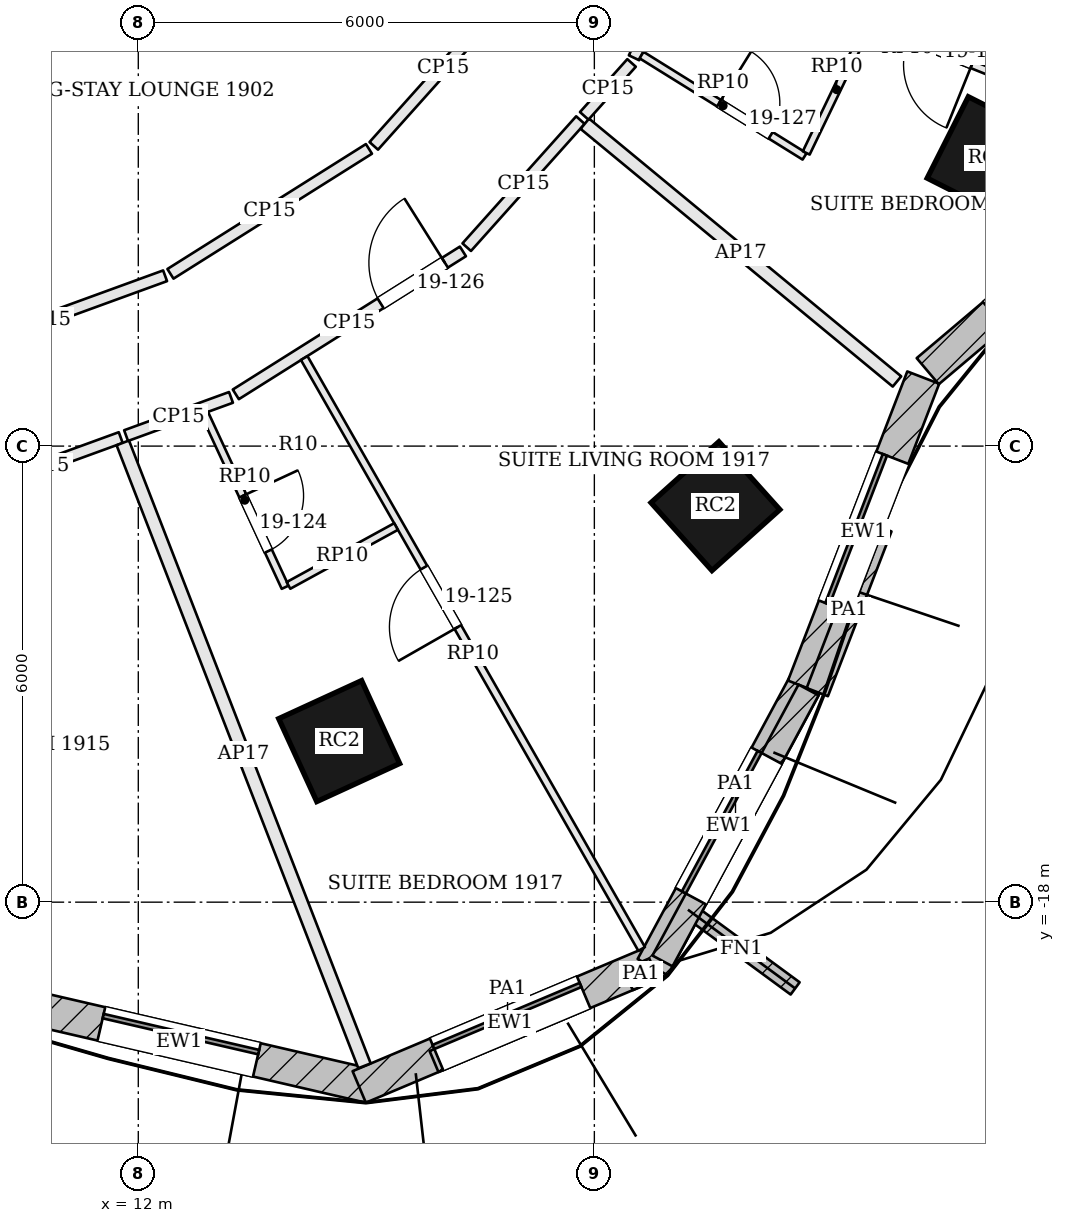
"""IFC4 building model, lengths in metres.
Left out: names, types, materials, properties, quantities, classifications, styles, units other than length and angle.
Written with IfcOpenShell. Run it as: python <this file> out.ifc"""

import sys

from ifc_helpers import new_model, si_unit, direction, frame, frame_2d, origin, origin_2d, place, context, subcontext, project, spatial, rectangle, extrude, element, fill, save


model = new_model("IFC4")
c1 = context("Model", 3, precision=1e-05, world=origin(), true_north=direction((0.0, 1.0)))
c2 = subcontext(c1, "Body", "Model", "MODEL_VIEW")
j1 = project(units=[si_unit("LENGTHUNIT", "METRE"), si_unit("PLANEANGLEUNIT", "RADIAN")], contexts=[c1])
p1 = place(None, origin())
s1 = spatial("IfcSite", under=j1, at=p1, CompositionType="ELEMENT")
p2 = place(p1, origin())
s2 = spatial("IfcBuilding", under=s1, at=p2, CompositionType="ELEMENT")
p3 = place(p2, frame((0.0, 0.0, 85.2)))
s3 = spatial("IfcBuildingStorey", under=s2, at=p3, CompositionType="ELEMENT", Elevation=85.2)
for number, where, z_axis, x_axis in (
    (1, (14.643, -15.881, 0.0), (0.0, 0.0, 1.0), (0.909, 0.417, 0.0)),
    (2, (19.593, -12.79, 0.0), (0.0, 0.0, 1.0), (0.744, 0.668, 0.0)),
    (3, (23.185, -8.21, 0.0), (0.0, 0.0, 1.0), (0.451, 0.893, 0.0)),
):
    element("IfcColumn", number, at=place(p3, frame(where, z_axis=z_axis, x_axis=x_axis)), inside=s3, PredefinedType="COLUMN", context=c2, shape_type="SweptSolid", body=[
        extrude(rectangle(XDim=1.2, YDim=1.2, at=origin_2d()), origin(), (0.0, 0.0, 1.0), 3.6),
    ])
p4 = place(p3, frame((10.034, -19.259, 0.0), z_axis=(0.0, 0.0, 1.0), x_axis=(0.974223567844, -0.225584662283, 0.0)))
e4 = element("IfcWall", 4, at=p4, inside=s3, PredefinedType="SOLIDWALL", context=c2, shape_type="SweptSolid", body=[
    extrude(rectangle(XDim=5.139, YDim=0.45, at=frame_2d((2.569, 0.0))), origin(), (0.0, 0.0, 1.0), 3.4),
])
p5 = place(p4, frame((1.519, 0.0, 0.9)))
e5 = element("IfcOpeningElement", 5, at=p5, cuts=e4, PredefinedType="OPENING", context=c2, shape_type="SweptSolid", body=[
    extrude(rectangle(XDim=2.1, YDim=2.0, at=frame_2d((1.05, 1.0))), frame((0.0, 0.235, 0.0), z_axis=(0.0, -1.0, 0.0), x_axis=(1.0, 0.0, 0.0)), (0.0, 0.0, 1.0), 0.47),
])
p6 = place(p3, frame((14.906, -20.431, 0.0), z_axis=(0.0, 0.0, 1.0), x_axis=(0.921435803521, 0.388530642279, 0.0)))
e6 = element("IfcWall", 6, at=p6, inside=s3, PredefinedType="SOLIDWALL", context=c2, shape_type="SweptSolid", body=[
    extrude(rectangle(XDim=4.309, YDim=0.45, at=frame_2d((2.154, 0.0))), origin(), (0.0, 0.0, 1.0), 3.4),
])
p7 = place(p6, frame((1.104, 0.0, 0.9)))
e7 = element("IfcOpeningElement", 7, at=p7, cuts=e6, PredefinedType="OPENING", context=c2, shape_type="SweptSolid", body=[
    extrude(rectangle(XDim=2.1, YDim=2.0, at=frame_2d((1.05, 1.0))), frame((0.0, 0.235, 0.0), z_axis=(0.0, -1.0, 0.0), x_axis=(1.0, 0.0, 0.0)), (0.0, 0.0, 1.0), 0.47),
])
p8 = place(p3, frame((18.767, -18.854, 0.0), z_axis=(0.0, 0.0, 1.0), x_axis=(0.474475888716, 0.880268499395, 0.0)))
e8 = element("IfcWall", 8, at=p8, inside=s3, PredefinedType="SOLIDWALL", context=c2, shape_type="SweptSolid", body=[
    extrude(rectangle(XDim=4.219, YDim=0.45, at=frame_2d((2.11, 0.0))), origin(), (0.0, 0.0, 1.0), 3.4),
])
p9 = place(p8, frame((1.06, 0.0, 0.9)))
e9 = element("IfcOpeningElement", 9, at=p9, cuts=e8, PredefinedType="OPENING", context=c2, shape_type="SweptSolid", body=[
    extrude(rectangle(XDim=2.1, YDim=2.0, at=frame_2d((1.05, 1.0))), frame((0.0, 0.235, 0.0), z_axis=(0.0, -1.0, 0.0), x_axis=(1.0, 0.0, 0.0)), (0.0, 0.0, 1.0), 0.47),
])
p10 = place(p3, frame((20.757, -15.166, 0.0), z_axis=(0.0, 0.0, 1.0), x_axis=(0.360067043581, 0.932926430179, 0.0)))
e10 = element("IfcWall", 10, at=p10, inside=s3, PredefinedType="SOLIDWALL", context=c2, shape_type="SweptSolid", body=[
    extrude(rectangle(XDim=4.36, YDim=0.45, at=frame_2d((2.18, 0.0))), origin(), (0.0, 0.0, 1.0), 3.4),
])
p11 = place(p10, frame((1.13, 0.0, 0.9)))
e11 = element("IfcOpeningElement", 11, at=p11, cuts=e10, PredefinedType="OPENING", context=c2, shape_type="SweptSolid", body=[
    extrude(rectangle(XDim=2.1, YDim=2.0, at=frame_2d((1.05, 1.0))), frame((0.0, 0.235, 0.0), z_axis=(0.0, -1.0, 0.0), x_axis=(1.0, 0.0, 0.0)), (0.0, 0.0, 1.0), 0.47),
])
p12 = place(p3, frame((22.386, -11.014, 0.0), z_axis=(0.0, 0.0, 1.0), x_axis=(0.763569952162, 0.645725118108, 0.0)))
e12 = element("IfcWall", 12, at=p12, inside=s3, PredefinedType="SOLIDWALL", context=c2, shape_type="SweptSolid", body=[
    extrude(rectangle(XDim=4.386, YDim=0.45, at=frame_2d((2.193, 0.0))), origin(), (0.0, 0.0, 1.0), 3.4),
])
p13 = place(p12, frame((1.143, 0.0, 0.9)))
e13 = element("IfcOpeningElement", 13, at=p13, cuts=e12, PredefinedType="OPENING", context=c2, shape_type="SweptSolid", body=[
    extrude(rectangle(XDim=2.1, YDim=2.0, at=frame_2d((1.05, 1.0))), frame((0.0, 0.235, 0.0), z_axis=(0.0, -1.0, 0.0), x_axis=(1.0, 0.0, 0.0)), (0.0, 0.0, 1.0), 0.47),
])
p14 = place(p3, frame((19.231, -18.099, 0.0), z_axis=(0.0, 0.0, 1.0), x_axis=(0.806085538754, -0.591799040394, 0.0)))
e14 = element("IfcWall", 14, at=p14, inside=s3, PredefinedType="SOLIDWALL", context=c2, shape_type="SweptSolid", body=[
    extrude(rectangle(XDim=1.75, YDim=0.2, at=frame_2d((0.875, 0.0))), origin(), (0.0, 0.0, 1.0), 3.4),
])
p15 = place(p3, frame((15.891, -20.097, 3.6), z_axis=(0.0, 0.0, 1.0), x_axis=(0.921468908678, 0.388452121038, 0.0)))
e15 = element("IfcWall", 15, at=p15, inside=s3, PredefinedType="PARAPET", context=c2, shape_type="SweptSolid", body=[
    extrude(rectangle(XDim=2.099, YDim=0.3, at=frame_2d((1.05, 0.0))), origin(), (0.0, 0.0, 1.0), 1.1),
])
p16 = place(p3, frame((18.446, -19.02, 3.6), z_axis=(0.0, 0.0, 1.0), x_axis=(0.921356634102, 0.388718346358, 0.0)))
e16 = element("IfcWall", 16, at=p16, inside=s3, PredefinedType="PARAPET", context=c2, shape_type="SweptSolid", body=[
    extrude(rectangle(XDim=0.363, YDim=0.3, at=frame_2d((0.182, 0.0))), origin(), (0.0, 0.0, 1.0), 1.1),
])
p17 = place(p3, frame((18.896, -18.773, 3.6), z_axis=(0.0, 0.0, 1.0), x_axis=(0.474444905835, 0.880285198857, 0.0)))
e17 = element("IfcWall", 17, at=p17, inside=s3, PredefinedType="PARAPET", context=c2, shape_type="SweptSolid", body=[
    extrude(rectangle(XDim=4.05, YDim=0.3, at=frame_2d((2.025, 0.0))), origin(), (0.0, 0.0, 1.0), 1.1),
])
p18 = place(p3, frame((20.933, -15.237, 3.6), z_axis=(0.0, 0.0, 1.0), x_axis=(0.360021038217, 0.932944184848, 0.0)))
e18 = element("IfcWall", 18, at=p18, inside=s3, PredefinedType="PARAPET", context=c2, shape_type="SweptSolid", body=[
    extrude(rectangle(XDim=2.323, YDim=0.3, at=frame_2d((1.162, 0.0))), origin(), (0.0, 0.0, 1.0), 1.1),
])
p19 = place(p3, frame((9.728, -12.631, 0.0), z_axis=(0.0, 0.0, 1.0), x_axis=(0.939625968265, 0.342203214133, 0.0)))
e19 = element("IfcWall", 19, at=p19, inside=s3, PredefinedType="PARTITIONING", context=c2, shape_type="SweptSolid", body=[
    extrude(rectangle(XDim=2.172, YDim=0.15, at=frame_2d((1.086, 0.0))), origin(), (0.0, 0.0, 1.0), 2.784),
])
p20 = place(p3, frame((14.976, -20.153, 0.0), z_axis=(0.0, 0.0, 1.0), x_axis=(-0.361741189075, 0.932278559298, 0.0)))
e20 = element("IfcWall", 20, at=p20, inside=s3, PredefinedType="PARTITIONING", context=c2, shape_type="SweptSolid", body=[
    extrude(rectangle(XDim=8.791, YDim=0.175, at=frame_2d((4.395, 0.0))), origin(), (0.0, 0.0, 1.0), 2.784),
])
p21 = place(p3, frame((11.839, -11.862, 0.0), z_axis=(0.0, 0.0, 1.0), x_axis=(0.939613732968, 0.342236808099, 0.0)))
e21 = element("IfcWall", 21, at=p21, inside=s3, PredefinedType="PARTITIONING", context=c2, shape_type="SweptSolid", body=[
    extrude(rectangle(XDim=1.469, YDim=0.15, at=frame_2d((0.734, 0.0))), origin(), (0.0, 0.0, 1.0), 2.784),
])
p22 = place(p3, frame((13.283, -11.319, 0.0), z_axis=(0.0, 0.0, 1.0), x_axis=(0.84630789582, 0.532694044901, 0.0)))
e22 = element("IfcWall", 22, at=p22, inside=s3, PredefinedType="PARTITIONING", context=c2, shape_type="SweptSolid", body=[
    extrude(rectangle(XDim=3.53, YDim=0.15, at=frame_2d((1.765, 0.0))), origin(), (0.0, 0.0, 1.0), 2.784),
])
p23 = place(p22, frame((2.25, 0.0, 0.0)))
e23 = element("IfcOpeningElement", 23, at=p23, cuts=e22, PredefinedType="OPENING", context=c2, shape_type="SweptSolid", body=[
    extrude(rectangle(XDim=1.0, YDim=2.1, at=frame_2d((0.5, 1.05))), frame((0.0, 0.085, 0.0), z_axis=(0.0, -1.0, 0.0), x_axis=(1.0, 0.0, 0.0)), (0.0, 0.0, 1.0), 0.17),
])
p24 = place(p3, frame((16.321, -9.383, 0.0), z_axis=(0.0, 0.0, 1.0), x_axis=(0.666839397401, 0.745201461401, 0.0)))
e24 = element("IfcWall", 24, at=p24, inside=s3, PredefinedType="PARTITIONING", context=c2, shape_type="SweptSolid", body=[
    extrude(rectangle(XDim=2.243, YDim=0.15, at=frame_2d((1.122, 0.0))), origin(), (0.0, 0.0, 1.0), 2.784),
])
p25 = place(p3, frame((21.981, -11.15, 0.0), z_axis=(0.0, 0.0, 1.0), x_axis=(-0.77113299289, 0.636674098167, 0.0)))
e25 = element("IfcWall", 25, at=p25, inside=s3, PredefinedType="PARTITIONING", context=c2, shape_type="SweptSolid", body=[
    extrude(rectangle(XDim=5.325, YDim=0.175, at=frame_2d((2.663, 0.0))), origin(), (0.0, 0.0, 1.0), 2.784),
])
p26 = place(p3, frame((17.867, -7.655, 0.0), z_axis=(0.0, 0.0, 1.0), x_axis=(0.666810140689, 0.745227640574, 0.0)))
e26 = element("IfcWall", 26, at=p26, inside=s3, PredefinedType="PARTITIONING", context=c2, shape_type="SweptSolid", body=[
    extrude(rectangle(XDim=0.934, YDim=0.15, at=frame_2d((0.467, 0.0))), origin(), (0.0, 0.0, 1.0), 2.784),
])
p27 = place(p3, frame((18.522, -6.891, 0.0), z_axis=(0.0, 0.0, 1.0), x_axis=(0.428157819028, 0.903703979191, 0.0)))
e27 = element("IfcWall", 27, at=p27, inside=s3, PredefinedType="PARTITIONING", context=c2, shape_type="SweptSolid", body=[
    extrude(rectangle(XDim=2.349, YDim=0.15, at=frame_2d((1.175, 0.0))), origin(), (0.0, 0.0, 1.0), 2.784),
])
p28 = place(p3, frame((16.925, -6.009, 0.0), z_axis=(0.0, 0.0, 1.0), x_axis=(-0.666893859891, -0.745152722359, 0.0)))
e28 = element("IfcWall", 28, at=p28, inside=s3, PredefinedType="PARTITIONING", context=c2, shape_type="SweptSolid", body=[
    extrude(rectangle(XDim=2.739, YDim=0.15, at=frame_2d((1.37, 0.0))), origin(), (0.0, 0.0, 1.0), 2.784),
])
p29 = place(p3, frame((15.034, -8.09, 0.0), z_axis=(0.0, 0.0, 1.0), x_axis=(-0.846322679414, -0.532670557014, 0.0)))
e29 = element("IfcWall", 29, at=p29, inside=s3, PredefinedType="PARTITIONING", context=c2, shape_type="SweptSolid", body=[
    extrude(rectangle(XDim=3.085, YDim=0.15, at=frame_2d((1.543, 0.0))), origin(), (0.0, 0.0, 1.0), 2.784),
])
p30 = place(p3, frame((12.353, -9.76, 0.0), z_axis=(0.0, 0.0, 1.0), x_axis=(-0.939632450309, -0.342185415127, 0.0)))
e30 = element("IfcWall", 30, at=p30, inside=s3, PredefinedType="PARTITIONING", context=c2, shape_type="SweptSolid", body=[
    extrude(rectangle(XDim=3.368, YDim=0.15, at=frame_2d((1.684, 0.0))), origin(), (0.0, 0.0, 1.0), 2.784),
])
p31 = place(p3, frame((18.622, -18.615, 0.0), z_axis=(0.0, 0.0, 1.0), x_axis=(-0.495924530613, 0.868365625723, 0.0)))
e31 = element("IfcWall", 31, at=p31, inside=s3, PredefinedType="PARTITIONING", context=c2, shape_type="SweptSolid", body=[
    extrude(rectangle(XDim=8.952, YDim=0.1, at=frame_2d((4.476, 0.0))), origin(), (0.0, 0.0, 1.0), 2.784),
])
p32 = place(p31, frame((4.877, 0.0, 0.0)))
e32 = element("IfcOpeningElement", 32, at=p32, cuts=e31, PredefinedType="OPENING", context=c2, shape_type="SweptSolid", body=[
    extrude(rectangle(XDim=0.9, YDim=2.4, at=frame_2d((0.45, 1.2))), frame((0.0, 0.06, 0.0), z_axis=(0.0, -1.0, 0.0), x_axis=(1.0, 0.0, 0.0)), (0.0, 0.0, 1.0), 0.12),
])
p33 = place(p3, frame((12.87, -11.566, 0.0), z_axis=(0.0, 0.0, 1.0), x_axis=(0.42076187936, -0.907171119953, 0.0)))
e33 = element("IfcWall", 33, at=p33, inside=s3, PredefinedType="PARTITIONING", context=c2, shape_type="SweptSolid", body=[
    extrude(rectangle(XDim=2.525, YDim=0.1, at=frame_2d((1.263, 0.0))), origin(), (0.0, 0.0, 1.0), 2.784),
])
p34 = place(p33, frame((1.2, 0.0, 0.0)))
e34 = element("IfcOpeningElement", 34, at=p34, cuts=e33, PredefinedType="OPENING", context=c2, shape_type="SweptSolid", body=[
    extrude(rectangle(XDim=0.8, YDim=2.1, at=frame_2d((0.4, 1.05))), frame((0.0, 0.06, 0.0), z_axis=(0.0, -1.0, 0.0), x_axis=(1.0, 0.0, 0.0)), (0.0, 0.0, 1.0), 0.12),
])
p35 = place(p3, frame((13.976, -13.833, 0.0), z_axis=(0.0, 0.0, 1.0), x_axis=(0.877160016476, 0.480198193975, 0.0)))
e35 = element("IfcWall", 35, at=p35, inside=s3, PredefinedType="PARTITIONING", context=c2, shape_type="SweptSolid", body=[
    extrude(rectangle(XDim=1.613, YDim=0.1, at=frame_2d((0.807, 0.0))), origin(), (0.0, 0.0, 1.0), 2.784),
])
p36 = place(p3, frame((25.564, -8.027, 0.0), z_axis=(0.0, 0.0, 1.0), x_axis=(-0.927456159862, 0.373931907618, 0.0)))
e36 = element("IfcWall", 36, at=p36, inside=s3, PredefinedType="PARTITIONING", context=c2, shape_type="SweptSolid", body=[
    extrude(rectangle(XDim=6.788, YDim=0.1, at=frame_2d((3.394, 0.0))), origin(), (0.0, 0.0, 1.0), 2.784),
])
p37 = place(p36, frame((2.8, 0.0, 0.0)))
e37 = element("IfcOpeningElement", 37, at=p37, cuts=e36, PredefinedType="OPENING", context=c2, shape_type="SweptSolid", body=[
    extrude(rectangle(XDim=0.9, YDim=2.4, at=frame_2d((0.45, 1.2))), frame((0.0, 0.06, 0.0), z_axis=(0.0, -1.0, 0.0), x_axis=(1.0, 0.0, 0.0)), (0.0, 0.0, 1.0), 0.12),
])
p38 = place(p3, frame((18.621, -6.856, 0.0), z_axis=(0.0, 0.0, 1.0), x_axis=(0.849413013487, -0.527728654253, 0.0)))
e38 = element("IfcWall", 38, at=p38, inside=s3, PredefinedType="PARTITIONING", context=c2, shape_type="SweptSolid", body=[
    extrude(rectangle(XDim=2.525, YDim=0.1, at=frame_2d((1.262, 0.0))), origin(), (0.0, 0.0, 1.0), 2.784),
])
p39 = place(p38, frame((1.2, 0.0, 0.0)))
e39 = element("IfcOpeningElement", 39, at=p39, cuts=e38, PredefinedType="OPENING", context=c2, shape_type="SweptSolid", body=[
    extrude(rectangle(XDim=0.8, YDim=2.1, at=frame_2d((0.4, 1.05))), frame((0.0, 0.06, 0.0), z_axis=(0.0, -1.0, 0.0), x_axis=(1.0, 0.0, 0.0)), (0.0, 0.0, 1.0), 0.12),
])
p40 = place(p3, frame((20.788, -8.143, 0.0), z_axis=(0.0, 0.0, 1.0), x_axis=(0.433744136444, 0.901036083684, 0.0)))
e40 = element("IfcWall", 40, at=p40, inside=s3, PredefinedType="PARTITIONING", context=c2, shape_type="SweptSolid", body=[
    extrude(rectangle(XDim=1.848, YDim=0.1, at=frame_2d((0.924, 0.0))), origin(), (0.0, 0.0, 1.0), 2.784),
])
p41 = place(p5, origin())
e41 = element("IfcWindow", 41, at=p41, inside=s3, PartitioningType="SINGLE_PANEL", PredefinedType="WINDOW", context=c2, shape_type="SweptSolid", body=[
    extrude(rectangle(XDim=2.1, YDim=2.0, at=frame_2d((1.05, 1.0))), frame((0.0, 0.135, 0.0), z_axis=(0.0, -1.0, 0.0), x_axis=(1.0, 0.0, 0.0)), (0.0, 0.0, 1.0), 0.06),
])
fill(e5, e41)
p42 = place(p7, origin())
e42 = element("IfcWindow", 42, at=p42, inside=s3, PartitioningType="SINGLE_PANEL", PredefinedType="WINDOW", context=c2, shape_type="SweptSolid", body=[
    extrude(rectangle(XDim=2.1, YDim=2.0, at=frame_2d((1.05, 1.0))), frame((0.0, 0.135, 0.0), z_axis=(0.0, -1.0, 0.0), x_axis=(1.0, 0.0, 0.0)), (0.0, 0.0, 1.0), 0.06),
])
fill(e7, e42)
p43 = place(p9, origin())
e43 = element("IfcWindow", 43, at=p43, inside=s3, PartitioningType="SINGLE_PANEL", PredefinedType="WINDOW", context=c2, shape_type="SweptSolid", body=[
    extrude(rectangle(XDim=2.1, YDim=2.0, at=frame_2d((1.05, 1.0))), frame((0.0, 0.135, 0.0), z_axis=(0.0, -1.0, 0.0), x_axis=(1.0, 0.0, 0.0)), (0.0, 0.0, 1.0), 0.06),
])
fill(e9, e43)
p44 = place(p11, origin())
e44 = element("IfcWindow", 44, at=p44, inside=s3, PartitioningType="SINGLE_PANEL", PredefinedType="WINDOW", context=c2, shape_type="SweptSolid", body=[
    extrude(rectangle(XDim=2.1, YDim=2.0, at=frame_2d((1.05, 1.0))), frame((0.0, 0.135, 0.0), z_axis=(0.0, -1.0, 0.0), x_axis=(1.0, 0.0, 0.0)), (0.0, 0.0, 1.0), 0.06),
])
fill(e11, e44)
p45 = place(p34, origin())
e45 = element("IfcDoor", 45, at=p45, inside=s3, OperationType="SINGLE_SWING_LEFT", PredefinedType="DOOR", context=c2, shape_type="SweptSolid", body=[
    extrude(rectangle(XDim=0.8, YDim=2.1, at=frame_2d((0.4, 1.05))), frame((0.0, 0.025, 0.0), z_axis=(0.0, -1.0, 0.0), x_axis=(1.0, 0.0, 0.0)), (0.0, 0.0, 1.0), 0.05),
])
fill(e34, e45)
p46 = place(p32, origin())
e46 = element("IfcDoor", 46, at=p46, inside=s3, OperationType="SINGLE_SWING_LEFT", PredefinedType="DOOR", context=c2, shape_type="SweptSolid", body=[
    extrude(rectangle(XDim=0.9, YDim=2.4, at=frame_2d((0.45, 1.2))), frame((0.0, 0.025, 0.0), z_axis=(0.0, -1.0, 0.0), x_axis=(1.0, 0.0, 0.0)), (0.0, 0.0, 1.0), 0.05),
])
fill(e32, e46)
p47 = place(p23, origin())
e47 = element("IfcDoor", 47, at=p47, inside=s3, OperationType="SINGLE_SWING_RIGHT", PredefinedType="DOOR", context=c2, shape_type="SweptSolid", body=[
    extrude(rectangle(XDim=1.0, YDim=2.1, at=frame_2d((0.5, 1.05))), frame((0.0, 0.025, 0.0), z_axis=(0.0, -1.0, 0.0), x_axis=(1.0, 0.0, 0.0)), (0.0, 0.0, 1.0), 0.05),
])
fill(e23, e47)
p48 = place(p39, origin())
e48 = element("IfcDoor", 48, at=p48, inside=s3, OperationType="SINGLE_SWING_LEFT", PredefinedType="DOOR", context=c2, shape_type="SweptSolid", body=[
    extrude(rectangle(XDim=0.8, YDim=2.1, at=frame_2d((0.4, 1.05))), frame((0.0, 0.025, 0.0), z_axis=(0.0, -1.0, 0.0), x_axis=(1.0, 0.0, 0.0)), (0.0, 0.0, 1.0), 0.05),
])
fill(e39, e48)
p49 = place(p37, origin())
e49 = element("IfcDoor", 49, at=p49, inside=s3, OperationType="SINGLE_SWING_LEFT", PredefinedType="DOOR", context=c2, shape_type="SweptSolid", body=[
    extrude(rectangle(XDim=0.9, YDim=2.4, at=frame_2d((0.45, 1.2))), frame((0.0, 0.025, 0.0), z_axis=(0.0, -1.0, 0.0), x_axis=(1.0, 0.0, 0.0)), (0.0, 0.0, 1.0), 0.05),
])
fill(e37, e49)
save(model, sys.argv[1])
